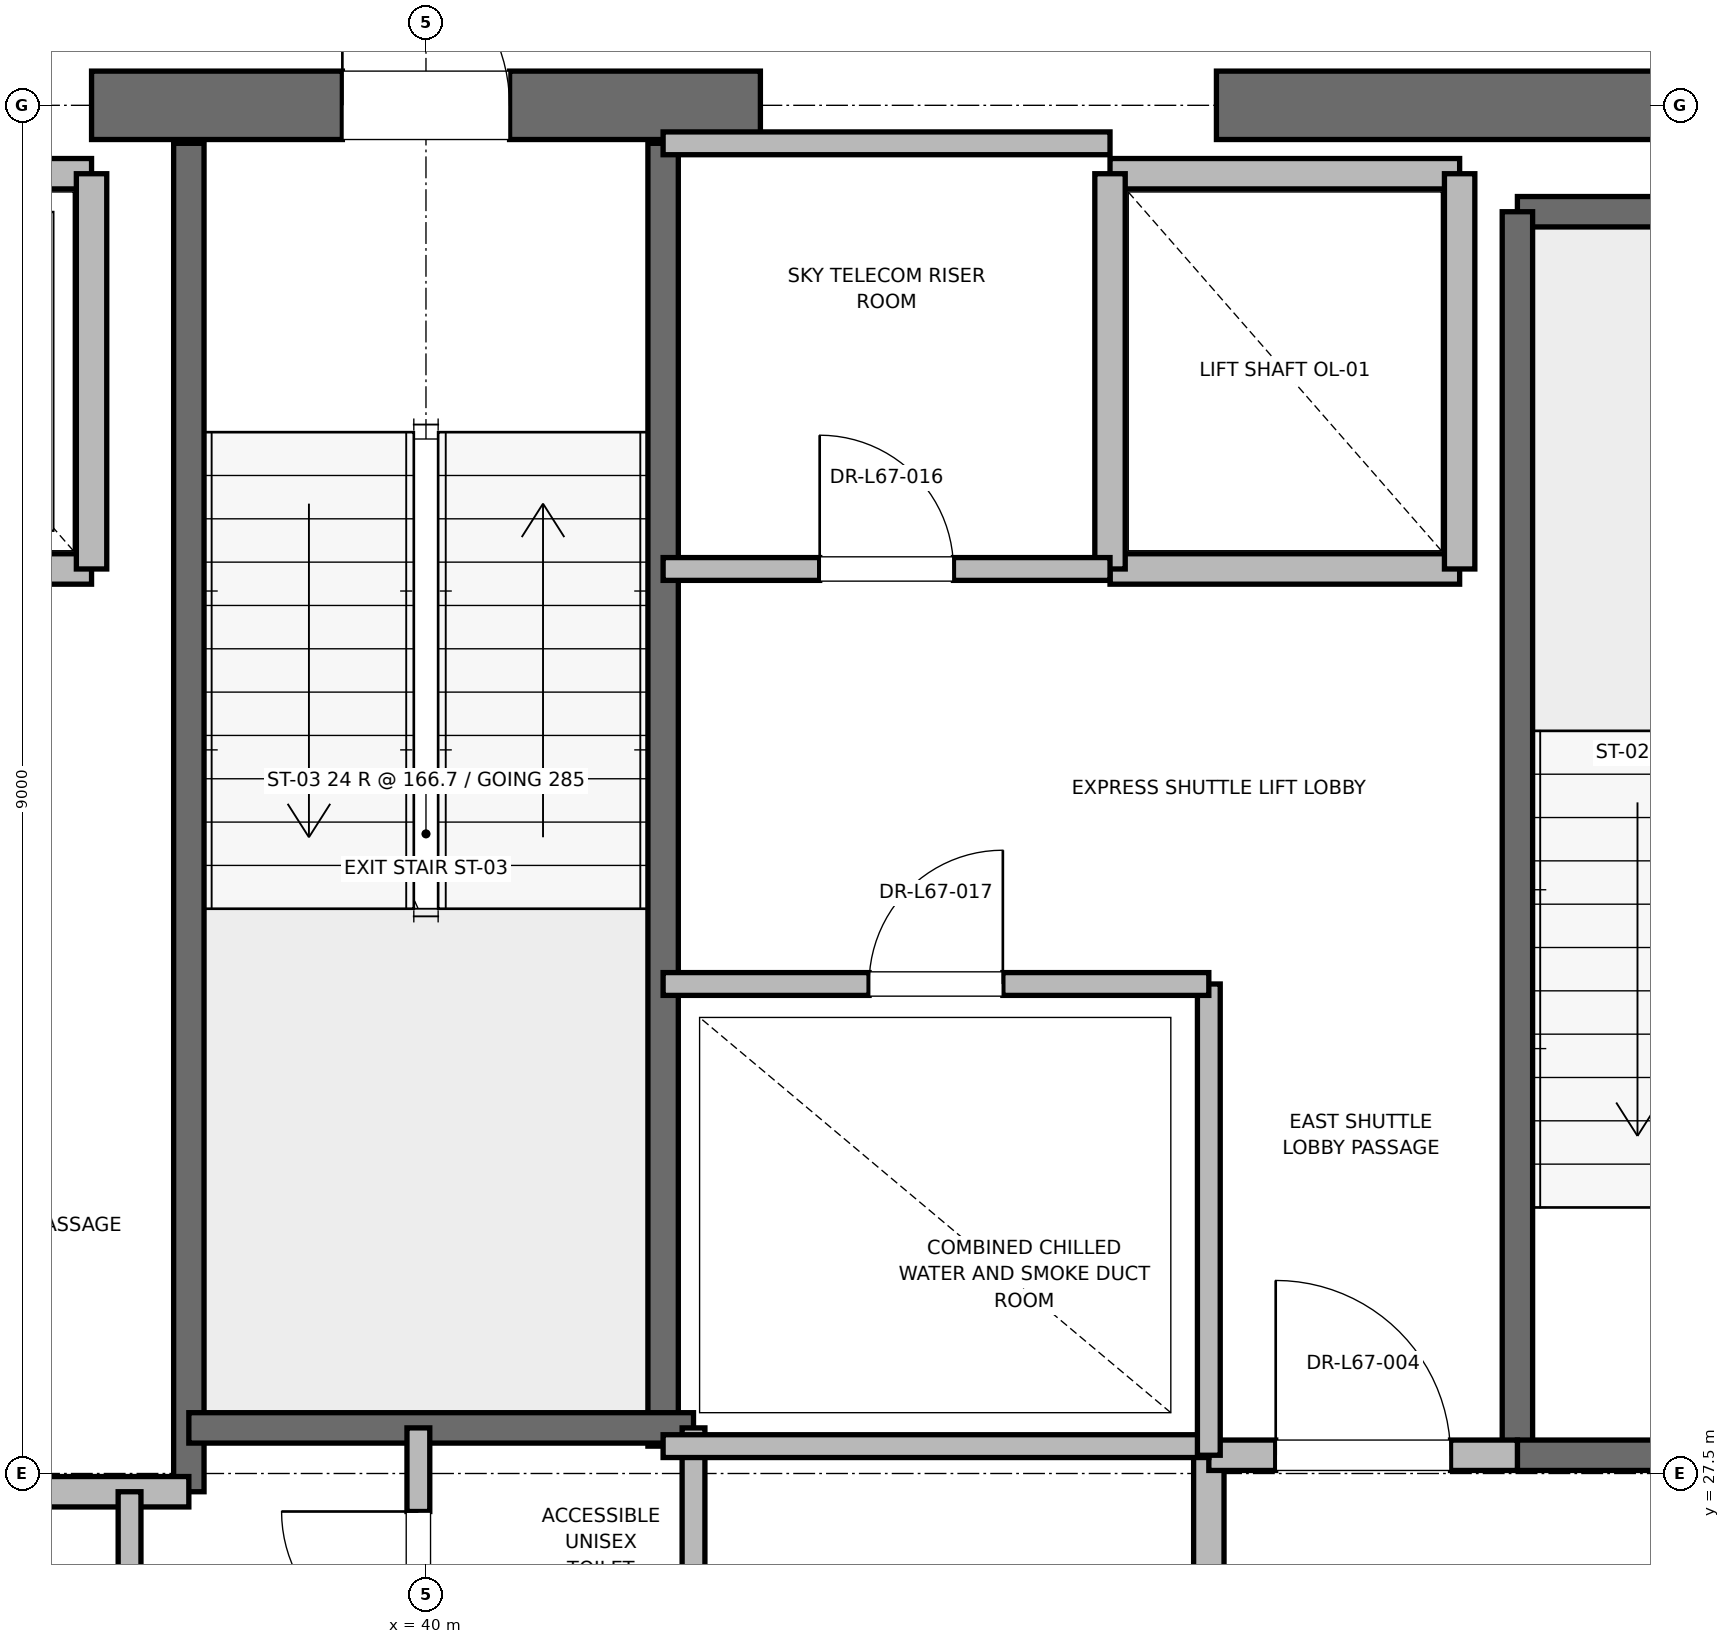
"""IFC4 building model, lengths in metres.
Left out: names, types, materials, properties, quantities, classifications, styles, units other than length and angle.
Written with IfcOpenShell. Run it as: python <this file> out.ifc"""

import sys

from ifc_helpers import new_model, si_unit, direction, frame, frame_2d, origin, place, context, subcontext, project, spatial, rectangle, extrude, element, fill, save


model = new_model("IFC4")
c1 = context("Model", 3, precision=1e-05, world=origin(), true_north=direction((0.0, 1.0)))
c2 = subcontext(c1, "Body", "Model", "MODEL_VIEW")
j1 = project(units=[si_unit("LENGTHUNIT", "METRE"), si_unit("PLANEANGLEUNIT", "RADIAN")], contexts=[c1])
p1 = place(None, origin())
s1 = spatial("IfcSite", under=j1, at=p1, CompositionType="ELEMENT")
p2 = place(p1, origin())
s2 = spatial("IfcBuilding", under=s1, at=p2, CompositionType="ELEMENT")
p3 = place(p2, frame((0.0, 0.0, 287.2)))
s3 = spatial("IfcBuildingStorey", under=s2, at=p3, CompositionType="ELEMENT", Elevation=287.2)
p4 = place(p3, frame((37.8, 36.5, 0.0), z_axis=(0.0, 0.0, 1.0), x_axis=(1.0, 0.0, 0.0)))
e1 = element("IfcWall", 1, at=p4, inside=s3, PredefinedType="SHEAR", context=c2, shape_type="SweptSolid", body=[
    extrude(rectangle(XDim=4.4, YDim=0.45, at=frame_2d((2.2, 0.0))), origin(), (0.0, 0.0, 1.0), 3.785),
])
p5 = place(p4, frame((1.65, 0.0, 0.0)))
e2 = element("IfcOpeningElement", 2, at=p5, cuts=e1, PredefinedType="OPENING", context=c2, shape_type="SweptSolid", body=[
    extrude(rectangle(XDim=1.1, YDim=2.15, at=frame_2d((0.55, 1.075))), frame((0.0, 0.225, 0.0), z_axis=(0.0, -1.0, 0.0), x_axis=(1.0, 0.0, 0.0)), (0.0, 0.0, 1.0), 0.45),
])
p6 = place(p3, frame((45.2, 36.5, 0.0), z_axis=(0.0, 0.0, 1.0), x_axis=(1.0, 0.0, 0.0)))
e3 = element("IfcWall", 3, at=p6, inside=s3, PredefinedType="SHEAR", context=c2, shape_type="SweptSolid", body=[
    extrude(rectangle(XDim=5.8, YDim=0.45, at=frame_2d((2.9, 0.0))), origin(), (0.0, 0.0, 1.0), 3.785),
])
p7 = place(p3, frame((47.18, 35.8, 0.0), z_axis=(0.0, 0.0, 1.0), x_axis=(1.0, 0.0, 0.0)))
e4 = element("IfcWall", 4, at=p7, inside=s3, PredefinedType="SOLIDWALL", context=c2, shape_type="SweptSolid", body=[
    extrude(rectangle(XDim=3.12, YDim=0.2, at=frame_2d((1.56, 0.0))), origin(), (0.0, 0.0, 1.0), 3.785),
])
p8 = place(p3, frame((47.18, 27.62, 0.0), z_axis=(0.0, 0.0, 1.0), x_axis=(0.0, 1.0, 0.0)))
e5 = element("IfcWall", 5, at=p8, inside=s3, PredefinedType="SOLIDWALL", context=c2, shape_type="SweptSolid", body=[
    extrude(rectangle(XDim=8.18, YDim=0.2, at=frame_2d((4.09, 0.0))), origin(), (0.0, 0.0, 1.0), 3.785),
])
p9 = place(p3, frame((47.18, 27.62, 0.0), z_axis=(0.0, 0.0, 1.0), x_axis=(1.0, 0.0, 0.0)))
e6 = element("IfcWall", 6, at=p9, inside=s3, PredefinedType="SOLIDWALL", context=c2, shape_type="SweptSolid", body=[
    extrude(rectangle(XDim=3.12, YDim=0.2, at=frame_2d((1.56, 0.0))), origin(), (0.0, 0.0, 1.0), 3.785),
])
p10 = place(p9, frame((1.01, 0.0, 0.0)))
e7 = element("IfcOpeningElement", 7, at=p10, cuts=e6, PredefinedType="OPENING", context=c2, shape_type="SweptSolid", body=[
    extrude(rectangle(XDim=1.1, YDim=2.15, at=frame_2d((0.55, 1.075))), frame((0.0, 0.1, 0.0), z_axis=(0.0, -1.0, 0.0), x_axis=(1.0, 0.0, 0.0)), (0.0, 0.0, 1.0), 0.2),
])
p11 = place(p3, frame((38.44, 27.38, 0.0), z_axis=(0.0, 0.0, 1.0), x_axis=(0.0, 1.0, 0.0)))
e8 = element("IfcWall", 8, at=p11, inside=s3, PredefinedType="SOLIDWALL", context=c2, shape_type="SweptSolid", body=[
    extrude(rectangle(XDim=8.87, YDim=0.2, at=frame_2d((4.435, 0.0))), origin(), (0.0, 0.0, 1.0), 3.785),
])
p12 = place(p3, frame((41.56, 27.68, 0.0), z_axis=(0.0, 0.0, 1.0), x_axis=(0.0, 1.0, 0.0)))
e9 = element("IfcWall", 9, at=p12, inside=s3, PredefinedType="SOLIDWALL", context=c2, shape_type="SweptSolid", body=[
    extrude(rectangle(XDim=8.57, YDim=0.2, at=frame_2d((4.285, 0.0))), origin(), (0.0, 0.0, 1.0), 3.785),
])
p13 = place(p3, frame((38.44, 27.8, 0.0), z_axis=(0.0, 0.0, 1.0), x_axis=(1.0, 0.0, 0.0)))
e10 = element("IfcWall", 10, at=p13, inside=s3, PredefinedType="SOLIDWALL", context=c2, shape_type="SweptSolid", body=[
    extrude(rectangle(XDim=3.32, YDim=0.2, at=frame_2d((1.66, 0.0))), origin(), (0.0, 0.0, 1.0), 3.785),
])
p14 = place(p3, frame((32.82, 27.38, 0.0), z_axis=(0.0, 0.0, 1.0), x_axis=(1.0, 0.0, 0.0)))
e11 = element("IfcWall", 11, at=p14, inside=s3, PredefinedType="PARTITIONING", context=c2, shape_type="SweptSolid", body=[
    extrude(rectangle(XDim=5.62, YDim=0.2, at=frame_2d((2.81, 0.0))), origin(), (0.0, 0.0, 1.0), 3.785),
])
p15 = place(p3, frame((45.15, 24.25, 0.0), z_axis=(0.0, 0.0, 1.0), x_axis=(0.0, 1.0, 0.0)))
e12 = element("IfcWall", 12, at=p15, inside=s3, PredefinedType="PARTITIONING", context=c2, shape_type="SweptSolid", body=[
    extrude(rectangle(XDim=3.37, YDim=0.2, at=frame_2d((1.685, 0.0))), origin(), (0.0, 0.0, 1.0), 3.785),
])
p16 = place(p3, frame((45.15, 27.62, 0.0), z_axis=(0.0, 0.0, 1.0), x_axis=(1.0, 0.0, 0.0)))
e13 = element("IfcWall", 13, at=p16, inside=s3, PredefinedType="PARTITIONING", context=c2, shape_type="SweptSolid", body=[
    extrude(rectangle(XDim=2.03, YDim=0.2, at=frame_2d((1.015, 0.0))), origin(), (0.0, 0.0, 1.0), 3.785),
])
p17 = place(p16, frame((0.44, 0.0, 0.0)))
e14 = element("IfcOpeningElement", 14, at=p17, cuts=e13, PredefinedType="OPENING", context=c2, shape_type="SweptSolid", body=[
    extrude(rectangle(XDim=1.15, YDim=2.2, at=frame_2d((0.575, 1.1))), frame((0.0, 0.1, 0.0), z_axis=(0.0, -1.0, 0.0), x_axis=(1.0, 0.0, 0.0)), (0.0, 0.0, 1.0), 0.2),
])
p18 = place(p3, frame((35.5, 33.45, 0.0), z_axis=(0.0, 0.0, 1.0), x_axis=(1.0, 0.0, 0.0)))
e15 = element("IfcWall", 15, at=p18, inside=s3, PredefinedType="SOLIDWALL", context=c2, shape_type="SweptSolid", body=[
    extrude(rectangle(XDim=2.3, YDim=0.2, at=frame_2d((1.15, 0.0))), origin(), (0.0, 0.0, 1.0), 3.785),
])
p19 = place(p18, frame((0.6, 0.0, 0.0)))
e16 = element("IfcOpeningElement", 16, at=p19, cuts=e15, PredefinedType="OPENING", context=c2, shape_type="SweptSolid", body=[
    extrude(rectangle(XDim=1.1, YDim=2.2, at=frame_2d((0.55, 1.1))), frame((0.0, 0.1, 0.0), z_axis=(0.0, -1.0, 0.0), x_axis=(1.0, 0.0, 0.0)), (0.0, 0.0, 1.0), 0.2),
])
p20 = place(p3, frame((37.8, 36.05, 0.0), z_axis=(0.0, 0.0, 1.0), x_axis=(-1.0, 0.0, 0.0)))
e17 = element("IfcWall", 17, at=p20, inside=s3, PredefinedType="SOLIDWALL", context=c2, shape_type="SweptSolid", body=[
    extrude(rectangle(XDim=2.3, YDim=0.2, at=frame_2d((1.15, 0.0))), origin(), (0.0, 0.0, 1.0), 2.865),
])
p21 = place(p3, frame((37.8, 33.45, 0.0), z_axis=(0.0, 0.0, 1.0), x_axis=(0.0, 1.0, 0.0)))
e18 = element("IfcWall", 18, at=p21, inside=s3, PredefinedType="SOLIDWALL", context=c2, shape_type="SweptSolid", body=[
    extrude(rectangle(XDim=2.6, YDim=0.2, at=frame_2d((1.3, 0.0))), origin(), (0.0, 0.0, 1.0), 2.865),
])
p22 = place(p3, frame((44.5, 33.45, 0.0), z_axis=(0.0, 0.0, 1.0), x_axis=(1.0, 0.0, 0.0)))
e19 = element("IfcWall", 19, at=p22, inside=s3, PredefinedType="SOLIDWALL", context=c2, shape_type="SweptSolid", body=[
    extrude(rectangle(XDim=2.3, YDim=0.2, at=frame_2d((1.15, 0.0))), origin(), (0.0, 0.0, 1.0), 3.785),
])
p23 = place(p3, frame((46.8, 36.05, 0.0), z_axis=(0.0, 0.0, 1.0), x_axis=(-1.0, 0.0, 0.0)))
e20 = element("IfcWall", 20, at=p23, inside=s3, PredefinedType="SOLIDWALL", context=c2, shape_type="SweptSolid", body=[
    extrude(rectangle(XDim=2.3, YDim=0.2, at=frame_2d((1.15, 0.0))), origin(), (0.0, 0.0, 1.0), 2.865),
])
p24 = place(p3, frame((44.5, 36.05, 0.0), z_axis=(0.0, 0.0, 1.0), x_axis=(0.0, -1.0, 0.0)))
e21 = element("IfcWall", 21, at=p24, inside=s3, PredefinedType="SOLIDWALL", context=c2, shape_type="SweptSolid", body=[
    extrude(rectangle(XDim=2.6, YDim=0.2, at=frame_2d((1.3, 0.0))), origin(), (0.0, 0.0, 1.0), 2.865),
])
p25 = place(p3, frame((46.8, 33.45, 0.0), z_axis=(0.0, 0.0, 1.0), x_axis=(0.0, 1.0, 0.0)))
e22 = element("IfcWall", 22, at=p25, inside=s3, PredefinedType="SOLIDWALL", context=c2, shape_type="SweptSolid", body=[
    extrude(rectangle(XDim=2.6, YDim=0.2, at=frame_2d((1.3, 0.0))), origin(), (0.0, 0.0, 1.0), 3.785),
])
p26 = place(p3, frame((41.76, 23.8, 0.0), z_axis=(0.0, 0.0, 1.0), x_axis=(0.0, 1.0, 0.0)))
e23 = element("IfcWall", 23, at=p26, inside=s3, PredefinedType="PARTITIONING", context=c2, shape_type="SweptSolid", body=[
    extrude(rectangle(XDim=4.0, YDim=0.15, at=frame_2d((2.0, 0.0))), origin(), (0.0, 0.0, 1.0), 2.85),
])
p27 = place(p3, frame((39.95, 25.8, 0.0), z_axis=(0.0, 0.0, 1.0), x_axis=(0.0, 1.0, 0.0)))
e24 = element("IfcWall", 24, at=p27, inside=s3, PredefinedType="PARTITIONING", context=c2, shape_type="SweptSolid", body=[
    extrude(rectangle(XDim=2.0, YDim=0.15, at=frame_2d((1.0, 0.0))), origin(), (0.0, 0.0, 1.0), 2.85),
])
p28 = place(p27, frame((0.55, 0.0, 0.0)))
e25 = element("IfcOpeningElement", 25, at=p28, cuts=e24, PredefinedType="OPENING", context=c2, shape_type="SweptSolid", body=[
    extrude(rectangle(XDim=0.9, YDim=2.1, at=frame_2d((0.45, 1.05))), frame((0.0, 0.075, 0.0), z_axis=(0.0, -1.0, 0.0), x_axis=(1.0, 0.0, 0.0)), (0.0, 0.0, 1.0), 0.15),
])
p29 = place(p3, frame((38.05, 18.6, 0.0), z_axis=(0.0, 0.0, 1.0), x_axis=(0.0, 1.0, 0.0)))
e26 = element("IfcWall", 26, at=p29, inside=s3, PredefinedType="PARTITIONING", context=c2, shape_type="SweptSolid", body=[
    extrude(rectangle(XDim=8.78, YDim=0.15, at=frame_2d((4.39, 0.0))), origin(), (0.0, 0.0, 1.0), 2.85),
])
p30 = place(p29, frame((3.89, 0.0, 0.0)))
e27 = element("IfcOpeningElement", 27, at=p30, cuts=e26, PredefinedType="OPENING", context=c2, shape_type="SweptSolid", body=[
    extrude(rectangle(XDim=1.0, YDim=2.15, at=frame_2d((0.5, 1.075))), frame((0.0, 0.075, 0.0), z_axis=(0.0, -1.0, 0.0), x_axis=(1.0, 0.0, 0.0)), (0.0, 0.0, 1.0), 0.15),
])
p31 = place(p3, frame((41.56, 27.68, 0.0), z_axis=(0.0, 0.0, 1.0), x_axis=(1.0, 0.0, 0.0)))
e28 = element("IfcWall", 28, at=p31, inside=s3, PredefinedType="PARTITIONING", context=c2, shape_type="SweptSolid", body=[
    extrude(rectangle(XDim=3.59, YDim=0.15, at=frame_2d((1.795, 0.0))), origin(), (0.0, 0.0, 1.0), 2.85),
])
p32 = place(p3, frame((45.15, 27.62, 0.0), z_axis=(0.0, 0.0, 1.0), x_axis=(0.0, 1.0, 0.0)))
e29 = element("IfcWall", 29, at=p32, inside=s3, PredefinedType="PARTITIONING", context=c2, shape_type="SweptSolid", body=[
    extrude(rectangle(XDim=3.1, YDim=0.15, at=frame_2d((1.55, 0.0))), origin(), (0.0, 0.0, 1.0), 2.85),
])
p33 = place(p3, frame((41.56, 30.72, 0.0), z_axis=(0.0, 0.0, 1.0), x_axis=(1.0, 0.0, 0.0)))
e30 = element("IfcWall", 30, at=p33, inside=s3, PredefinedType="PARTITIONING", context=c2, shape_type="SweptSolid", body=[
    extrude(rectangle(XDim=3.59, YDim=0.15, at=frame_2d((1.795, 0.0))), origin(), (0.0, 0.0, 1.0), 2.85),
])
p34 = place(p33, frame((1.355, 0.0, 0.0)))
e31 = element("IfcOpeningElement", 31, at=p34, cuts=e30, PredefinedType="OPENING", context=c2, shape_type="SweptSolid", body=[
    extrude(rectangle(XDim=0.88, YDim=2.1, at=frame_2d((0.44, 1.05))), frame((0.0, 0.075, 0.0), z_axis=(0.0, -1.0, 0.0), x_axis=(1.0, 0.0, 0.0)), (0.0, 0.0, 1.0), 0.15),
])
p35 = place(p3, frame((41.56, 36.25, 0.0), z_axis=(0.0, 0.0, 1.0), x_axis=(1.0, 0.0, 0.0)))
e32 = element("IfcWall", 32, at=p35, inside=s3, PredefinedType="PARTITIONING", context=c2, shape_type="SweptSolid", body=[
    extrude(rectangle(XDim=2.94, YDim=0.15, at=frame_2d((1.47, 0.0))), origin(), (0.0, 0.0, 1.0), 2.85),
])
p36 = place(p3, frame((41.56, 33.45, 0.0), z_axis=(0.0, 0.0, 1.0), x_axis=(1.0, 0.0, 0.0)))
e33 = element("IfcWall", 33, at=p36, inside=s3, PredefinedType="PARTITIONING", context=c2, shape_type="SweptSolid", body=[
    extrude(rectangle(XDim=2.94, YDim=0.15, at=frame_2d((1.47, 0.0))), origin(), (0.0, 0.0, 1.0), 2.85),
])
p37 = place(p36, frame((1.03, 0.0, 0.0)))
e34 = element("IfcOpeningElement", 34, at=p37, cuts=e33, PredefinedType="OPENING", context=c2, shape_type="SweptSolid", body=[
    extrude(rectangle(XDim=0.88, YDim=2.1, at=frame_2d((0.44, 1.05))), frame((0.0, 0.075, 0.0), z_axis=(0.0, -1.0, 0.0), x_axis=(1.0, 0.0, 0.0)), (0.0, 0.0, 1.0), 0.15),
])
p38 = place(p5, origin())
e35 = element("IfcDoor", 35, at=p38, inside=s3, OperationType="SINGLE_SWING_LEFT", PredefinedType="DOOR", context=c2, shape_type="SweptSolid", body=[
    extrude(rectangle(XDim=1.1, YDim=2.15, at=frame_2d((0.55, 1.075))), frame((0.0, 0.025, 0.0), z_axis=(0.0, -1.0, 0.0), x_axis=(1.0, 0.0, 0.0)), (0.0, 0.0, 1.0), 0.05),
])
fill(e2, e35)
p39 = place(p17, origin())
e36 = element("IfcDoor", 36, at=p39, inside=s3, OperationType="SINGLE_SWING_LEFT", PredefinedType="DOOR", context=c2, shape_type="SweptSolid", body=[
    extrude(rectangle(XDim=1.15, YDim=2.2, at=frame_2d((0.575, 1.1))), frame((0.0, 0.025, 0.0), z_axis=(0.0, -1.0, 0.0), x_axis=(1.0, 0.0, 0.0)), (0.0, 0.0, 1.0), 0.05),
])
fill(e14, e36)
p40 = place(p28, origin())
e37 = element("IfcDoor", 37, at=p40, inside=s3, OperationType="SINGLE_SWING_RIGHT", PredefinedType="DOOR", context=c2, shape_type="SweptSolid", body=[
    extrude(rectangle(XDim=0.9, YDim=2.1, at=frame_2d((0.45, 1.05))), frame((0.0, 0.025, 0.0), z_axis=(0.0, -1.0, 0.0), x_axis=(1.0, 0.0, 0.0)), (0.0, 0.0, 1.0), 0.05),
])
fill(e25, e37)
p41 = place(p34, origin())
e38 = element("IfcDoor", 38, at=p41, inside=s3, OperationType="SINGLE_SWING_RIGHT", PredefinedType="DOOR", context=c2, shape_type="SweptSolid", body=[
    extrude(rectangle(XDim=0.88, YDim=2.1, at=frame_2d((0.44, 1.05))), frame((0.0, 0.025, 0.0), z_axis=(0.0, -1.0, 0.0), x_axis=(1.0, 0.0, 0.0)), (0.0, 0.0, 1.0), 0.05),
])
fill(e31, e38)
p42 = place(p37, origin())
e39 = element("IfcDoor", 39, at=p42, inside=s3, OperationType="SINGLE_SWING_LEFT", PredefinedType="DOOR", context=c2, shape_type="SweptSolid", body=[
    extrude(rectangle(XDim=0.88, YDim=2.1, at=frame_2d((0.44, 1.05))), frame((0.0, 0.025, 0.0), z_axis=(0.0, -1.0, 0.0), x_axis=(1.0, 0.0, 0.0)), (0.0, 0.0, 1.0), 0.05),
])
fill(e34, e39)
save(model, sys.argv[1])
